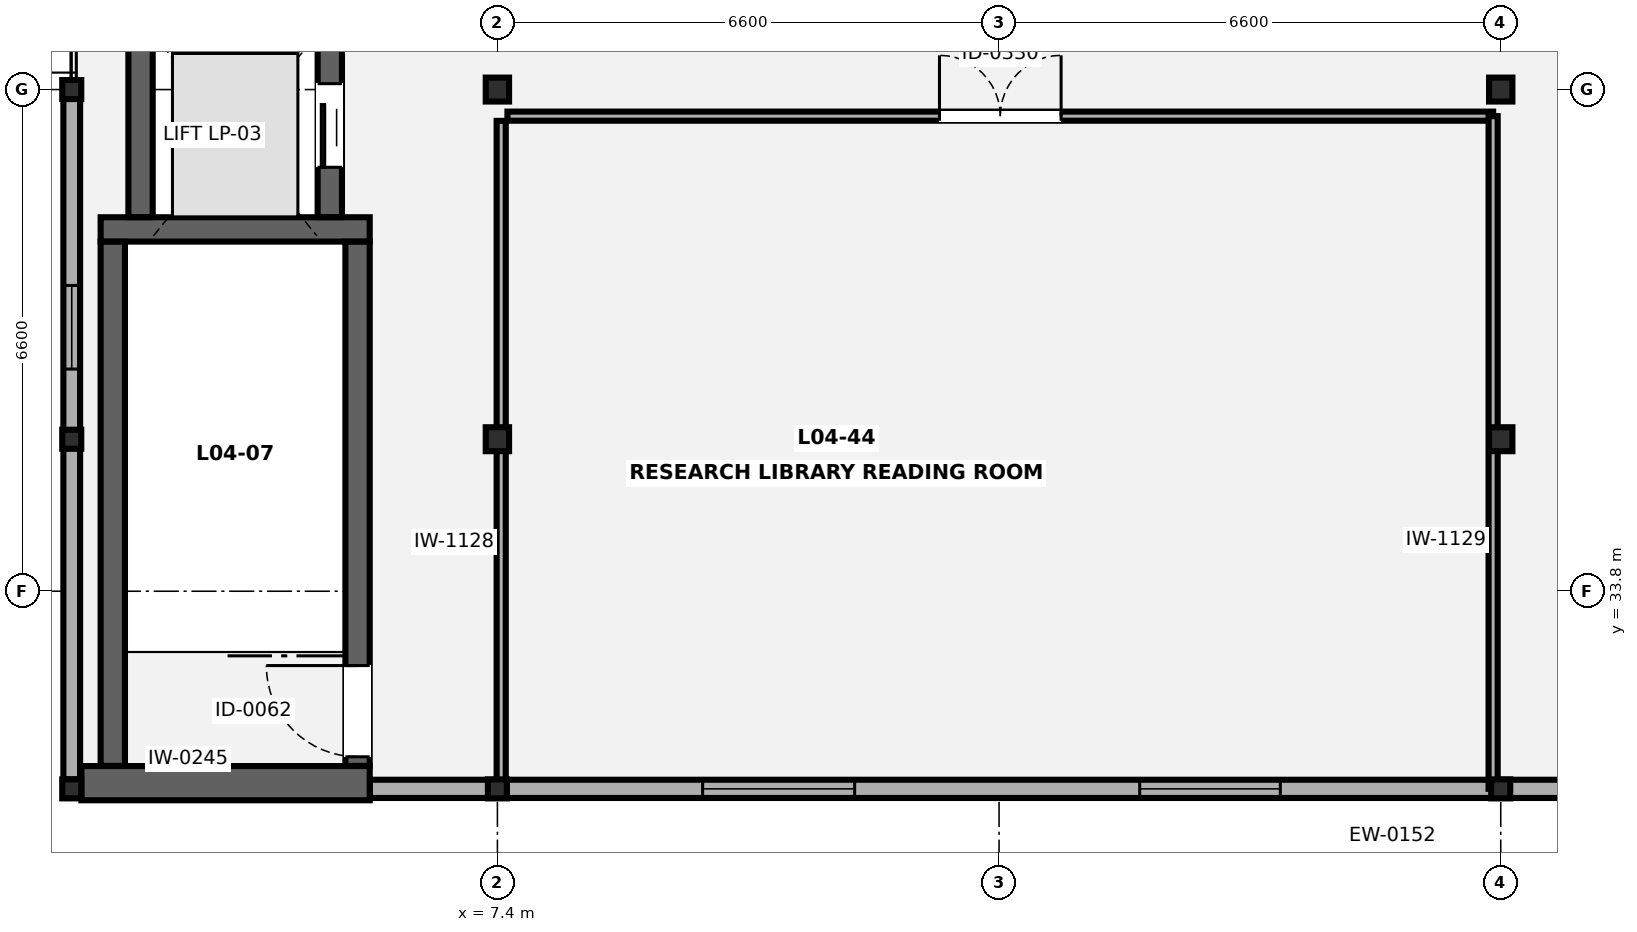
"""IFC4 building model, lengths in metres.
Left out: names, types, materials, properties, quantities, classifications, styles, units other than length and angle.
Written with IfcOpenShell. Run it as: python <this file> out.ifc"""

import sys

from ifc_helpers import new_model, si_unit, direction, frame, frame_2d, origin, origin_2d, place, context, subcontext, project, spatial, rectangle, hollow_rectangle, i_section, extrude, element, fill, save


model = new_model("IFC4")
c1 = context("Model", 3, precision=1e-05, world=origin(), true_north=direction((0.0, 1.0)))
c2 = subcontext(c1, "Body", "Model", "MODEL_VIEW")
j1 = project(units=[si_unit("LENGTHUNIT", "METRE"), si_unit("PLANEANGLEUNIT", "RADIAN")], contexts=[c1])
p1 = place(None, origin())
s1 = spatial("IfcSite", under=j1, at=p1, CompositionType="ELEMENT")
p2 = place(p1, origin())
s2 = spatial("IfcBuilding", under=s1, at=p2, CompositionType="ELEMENT")
p3 = place(p2, frame((0.0, 0.0, 17.5)))
s3 = spatial("IfcBuildingStorey", under=s2, at=p3, CompositionType="ELEMENT", Elevation=17.5)
for number, where, z_axis, x_axis in (
    (1, (1.8, 31.2, 0.0), (0.0, 0.0, 1.0), (1.0, 0.0, 0.0)),
    (2, (1.8, 35.8, 0.0), (0.0, 0.0, 1.0), (1.0, 0.0, 0.0)),
    (3, (1.8, 40.4, 0.0), (0.0, 0.0, 1.0), (1.0, 0.0, 0.0)),
    (4, (7.4, 31.2, 0.0), (0.0, 0.0, 1.0), (1.0, 0.0, 0.0)),
):
    element("IfcColumn", number, at=place(p3, frame(where, z_axis=z_axis, x_axis=x_axis)), inside=s3, PredefinedType="COLUMN", context=c2, shape_type="SweptSolid", body=[
        extrude(hollow_rectangle(XDim=0.25, YDim=0.25, WallThickness=0.012, at=origin_2d()), origin(), (0.0, 0.0, 1.0), 4.2),
    ])
for number, where, z_axis, x_axis in (
    (5, (7.4, 35.8, 0.0), (0.0, 0.0, 1.0), (1.0, 0.0, 0.0)),
    (6, (7.4, 40.4, 0.0), (0.0, 0.0, 1.0), (1.0, 0.0, 0.0)),
):
    element("IfcColumn", number, at=place(p3, frame(where, z_axis=z_axis, x_axis=x_axis)), inside=s3, PredefinedType="COLUMN", context=c2, shape_type="SweptSolid", body=[
        extrude(i_section(OverallWidth=0.307, OverallDepth=0.315, WebThickness=0.012, FlangeThickness=0.019, FilletRadius=0.017, at=origin_2d()), origin(), (0.0, 0.0, 1.0), 4.2),
    ])
p4 = place(p3, frame((20.6, 31.2, 0.0), z_axis=(0.0, 0.0, 1.0), x_axis=(1.0, 0.0, 0.0)))
e7 = element("IfcColumn", 7, at=p4, inside=s3, PredefinedType="COLUMN", context=c2, shape_type="SweptSolid", body=[
    extrude(hollow_rectangle(XDim=0.25, YDim=0.25, WallThickness=0.012, at=origin_2d()), origin(), (0.0, 0.0, 1.0), 4.2),
])
for number, where, z_axis, x_axis in (
    (8, (20.6, 35.8, 0.0), (0.0, 0.0, 1.0), (1.0, 0.0, 0.0)),
    (9, (20.6, 40.4, 0.0), (0.0, 0.0, 1.0), (1.0, 0.0, 0.0)),
):
    element("IfcColumn", number, at=place(p3, frame(where, z_axis=z_axis, x_axis=x_axis)), inside=s3, PredefinedType="COLUMN", context=c2, shape_type="SweptSolid", body=[
        extrude(i_section(OverallWidth=0.307, OverallDepth=0.315, WebThickness=0.012, FlangeThickness=0.019, FilletRadius=0.017, at=origin_2d()), origin(), (0.0, 0.0, 1.0), 4.2),
    ])
p5 = place(p3, frame((1.8, 31.323, 0.0), z_axis=(0.0, 0.0, 1.0), x_axis=(0.0, 1.0, 0.0)))
e10 = element("IfcWall", 10, at=p5, inside=s3, PredefinedType="SOLIDWALL", context=c2, shape_type="SweptSolid", body=[
    extrude(rectangle(XDim=8.954, YDim=0.22, at=frame_2d((4.477, 0.0))), origin(), (0.0, 0.0, 1.0), 3.445),
])
p6 = place(p5, frame((5.4, 0.0, 0.85)))
e11 = element("IfcOpeningElement", 11, at=p6, cuts=e10, PredefinedType="OPENING", context=c2, shape_type="SweptSolid", body=[
    extrude(rectangle(XDim=1.1, YDim=1.4, at=frame_2d((0.55, 0.7))), frame((0.0, 0.12, 0.0), z_axis=(0.0, -1.0, 0.0), x_axis=(1.0, 0.0, 0.0)), (0.0, 0.0, 1.0), 0.24),
])
p7 = place(p3, frame((27.077, 31.2, 0.0), z_axis=(0.0, 0.0, 1.0), x_axis=(-1.0, 0.0, 0.0)))
e12 = element("IfcWall", 12, at=p7, inside=s3, PredefinedType="SOLIDWALL", context=c2, shape_type="SweptSolid", body=[
    extrude(rectangle(XDim=21.355, YDim=0.24, at=frame_2d((10.677, 0.0))), origin(), (0.0, 0.0, 1.0), 3.505),
])
p8 = place(p7, frame((9.377, 0.0, 0.85)))
e13 = element("IfcOpeningElement", 13, at=p8, cuts=e12, PredefinedType="OPENING", context=c2, shape_type="SweptSolid", body=[
    extrude(rectangle(XDim=1.85, YDim=1.4, at=frame_2d((0.925, 0.7))), frame((0.0, 0.13, 0.0), z_axis=(0.0, -1.0, 0.0), x_axis=(1.0, 0.0, 0.0)), (0.0, 0.0, 1.0), 0.26),
])
p9 = place(p7, frame((14.977, 0.0, 0.85)))
e14 = element("IfcOpeningElement", 14, at=p9, cuts=e12, PredefinedType="OPENING", context=c2, shape_type="SweptSolid", body=[
    extrude(rectangle(XDim=2.0, YDim=1.4, at=frame_2d((1.0, 0.7))), frame((0.0, 0.13, 0.0), z_axis=(0.0, -1.0, 0.0), x_axis=(1.0, 0.0, 0.0)), (0.0, 0.0, 1.0), 0.26),
])
p10 = place(p3, frame((1.927, 31.275, 0.0), z_axis=(0.0, 0.0, 1.0), x_axis=(1.0, 0.0, 0.0)))
e15 = element("IfcWall", 15, at=p10, inside=s3, PredefinedType="SHEAR", context=c2, shape_type="SweptSolid", body=[
    extrude(rectangle(XDim=3.793, YDim=0.45, at=frame_2d((1.896, 0.0))), origin(), (0.0, 0.0, 1.0), 4.0),
])
p11 = place(p3, frame((2.18, 38.56, 0.0), z_axis=(0.0, 0.0, 1.0), x_axis=(1.0, 0.0, 0.0)))
e16 = element("IfcWall", 16, at=p11, inside=s3, PredefinedType="SHEAR", context=c2, shape_type="SweptSolid", body=[
    extrude(rectangle(XDim=3.54, YDim=0.32, at=frame_2d((1.77, 0.0))), origin(), (0.0, 0.0, 1.0), 4.0),
])
p12 = place(p3, frame((2.34, 31.502, 0.0), z_axis=(0.0, 0.0, 1.0), x_axis=(0.0, 1.0, 0.0)))
e17 = element("IfcWall", 17, at=p12, inside=s3, PredefinedType="SHEAR", context=c2, shape_type="SweptSolid", body=[
    extrude(rectangle(XDim=6.896, YDim=0.32, at=frame_2d((3.448, 0.0))), origin(), (0.0, 0.0, 1.0), 4.0),
])
p13 = place(p3, frame((5.56, 31.502, 0.0), z_axis=(0.0, 0.0, 1.0), x_axis=(0.0, 1.0, 0.0)))
e18 = element("IfcWall", 18, at=p13, inside=s3, PredefinedType="SHEAR", context=c2, shape_type="SweptSolid", body=[
    extrude(rectangle(XDim=6.896, YDim=0.32, at=frame_2d((3.448, 0.0))), origin(), (0.0, 0.0, 1.0), 4.0),
])
p14 = place(p13, frame((0.12, 0.0, 0.0)))
e19 = element("IfcOpeningElement", 19, at=p14, cuts=e18, PredefinedType="OPENING", context=c2, shape_type="SweptSolid", body=[
    extrude(rectangle(XDim=1.2, YDim=2.15, at=frame_2d((0.6, 1.075))), frame((0.0, 0.17, 0.0), z_axis=(0.0, -1.0, 0.0), x_axis=(1.0, 0.0, 0.0)), (0.0, 0.0, 1.0), 0.34),
])
p15 = place(p3, frame((2.705, 38.722, 0.0), z_axis=(0.0, 0.0, 1.0), x_axis=(0.0, 1.0, 0.0)))
e20 = element("IfcWall", 20, at=p15, inside=s3, PredefinedType="SHEAR", context=c2, shape_type="SweptSolid", body=[
    extrude(rectangle(XDim=2.411, YDim=0.32, at=frame_2d((1.206, 0.0))), origin(), (0.0, 0.0, 1.0), 4.0),
])
p16 = place(p3, frame((5.195, 38.722, 0.0), z_axis=(0.0, 0.0, 1.0), x_axis=(0.0, 1.0, 0.0)))
e21 = element("IfcWall", 21, at=p16, inside=s3, PredefinedType="SHEAR", context=c2, shape_type="SweptSolid", body=[
    extrude(rectangle(XDim=2.411, YDim=0.32, at=frame_2d((1.206, 0.0))), origin(), (0.0, 0.0, 1.0), 4.0),
])
p17 = place(p16, frame((0.656, 0.0, 0.0)))
e22 = element("IfcOpeningElement", 22, at=p17, cuts=e21, PredefinedType="OPENING", context=c2, shape_type="SweptSolid", body=[
    extrude(rectangle(XDim=1.1, YDim=2.15, at=frame_2d((0.55, 1.075))), frame((0.0, 0.17, 0.0), z_axis=(0.0, -1.0, 0.0), x_axis=(1.0, 0.0, 0.0)), (0.0, 0.0, 1.0), 0.34),
])
p18 = place(p3, frame((7.532, 40.05, 0.0), z_axis=(0.0, 0.0, 1.0), x_axis=(1.0, 0.0, 0.0)))
e23 = element("IfcWall", 23, at=p18, inside=s3, PredefinedType="PARTITIONING", context=c2, shape_type="SweptSolid", body=[
    extrude(rectangle(XDim=12.968, YDim=0.12, at=frame_2d((6.484, 0.0))), origin(), (0.0, 0.0, 1.0), 3.98),
])
p19 = place(p18, frame((5.684, 0.0, 0.0)))
e24 = element("IfcOpeningElement", 24, at=p19, cuts=e23, PredefinedType="OPENING", context=c2, shape_type="SweptSolid", body=[
    extrude(rectangle(XDim=1.6, YDim=2.18, at=frame_2d((0.8, 1.09))), frame((0.0, 0.07, 0.0), z_axis=(0.0, -1.0, 0.0), x_axis=(1.0, 0.0, 0.0)), (0.0, 0.0, 1.0), 0.14),
])
p20 = place(p3, frame((7.45, 31.2, 0.0), z_axis=(0.0, 0.0, 1.0), x_axis=(0.0, 1.0, 0.0)))
e25 = element("IfcWall", 25, at=p20, inside=s3, PredefinedType="PARTITIONING", context=c2, shape_type="SweptSolid", body=[
    extrude(rectangle(XDim=8.788, YDim=0.12, at=frame_2d((4.394, 0.0))), origin(), (0.0, 0.0, 1.0), 3.445),
])
p21 = place(p3, frame((20.5, 31.2, 0.0), z_axis=(0.0, 0.0, 1.0), x_axis=(0.0, 1.0, 0.0)))
e26 = element("IfcWall", 26, at=p21, inside=s3, PredefinedType="PARTITIONING", context=c2, shape_type="SweptSolid", body=[
    extrude(rectangle(XDim=8.85, YDim=0.12, at=frame_2d((4.425, 0.0))), origin(), (0.0, 0.0, 1.0), 3.445),
])
p22 = place(p6, origin())
e27 = element("IfcWindow", 27, at=p22, inside=s3, PartitioningType="SINGLE_PANEL", PredefinedType="WINDOW", context=c2, shape_type="SweptSolid", body=[
    extrude(rectangle(XDim=1.1, YDim=1.4, at=frame_2d((0.55, 0.7))), frame((0.0, 0.03, 0.0), z_axis=(0.0, -1.0, 0.0), x_axis=(1.0, 0.0, 0.0)), (0.0, 0.0, 1.0), 0.06),
])
fill(e11, e27)
p23 = place(p8, origin())
e28 = element("IfcWindow", 28, at=p23, inside=s3, PartitioningType="SINGLE_PANEL", PredefinedType="WINDOW", context=c2, shape_type="SweptSolid", body=[
    extrude(rectangle(XDim=1.85, YDim=1.4, at=frame_2d((0.925, 0.7))), frame((0.0, 0.03, 0.0), z_axis=(0.0, -1.0, 0.0), x_axis=(1.0, 0.0, 0.0)), (0.0, 0.0, 1.0), 0.06),
])
fill(e13, e28)
p24 = place(p9, origin())
e29 = element("IfcWindow", 29, at=p24, inside=s3, PartitioningType="SINGLE_PANEL", PredefinedType="WINDOW", context=c2, shape_type="SweptSolid", body=[
    extrude(rectangle(XDim=2.0, YDim=1.4, at=frame_2d((1.0, 0.7))), frame((0.0, 0.03, 0.0), z_axis=(0.0, -1.0, 0.0), x_axis=(1.0, 0.0, 0.0)), (0.0, 0.0, 1.0), 0.06),
])
fill(e14, e29)
p25 = place(p14, origin())
e30 = element("IfcDoor", 30, at=p25, inside=s3, OperationType="SINGLE_SWING_RIGHT", PredefinedType="DOOR", context=c2, shape_type="SweptSolid", body=[
    extrude(rectangle(XDim=1.2, YDim=2.15, at=frame_2d((0.6, 1.075))), frame((0.0, 0.025, 0.0), z_axis=(0.0, -1.0, 0.0), x_axis=(1.0, 0.0, 0.0)), (0.0, 0.0, 1.0), 0.05),
])
fill(e19, e30)
p26 = place(p17, origin())
e31 = element("IfcDoor", 31, at=p26, inside=s3, OperationType="SLIDING_TO_LEFT", PredefinedType="DOOR", context=c2, shape_type="SweptSolid", body=[
    extrude(rectangle(XDim=1.1, YDim=2.15, at=frame_2d((0.55, 1.075))), frame((0.0, 0.025, 0.0), z_axis=(0.0, -1.0, 0.0), x_axis=(1.0, 0.0, 0.0)), (0.0, 0.0, 1.0), 0.05),
])
fill(e22, e31)
p27 = place(p19, origin())
e32 = element("IfcDoor", 32, at=p27, inside=s3, OperationType="DOUBLE_DOOR_SINGLE_SWING", PredefinedType="DOOR", context=c2, shape_type="SweptSolid", body=[
    extrude(rectangle(XDim=1.6, YDim=2.18, at=frame_2d((0.8, 1.09))), frame((0.0, 0.025, 0.0), z_axis=(0.0, -1.0, 0.0), x_axis=(1.0, 0.0, 0.0)), (0.0, 0.0, 1.0), 0.05),
])
fill(e24, e32)
save(model, sys.argv[1])
